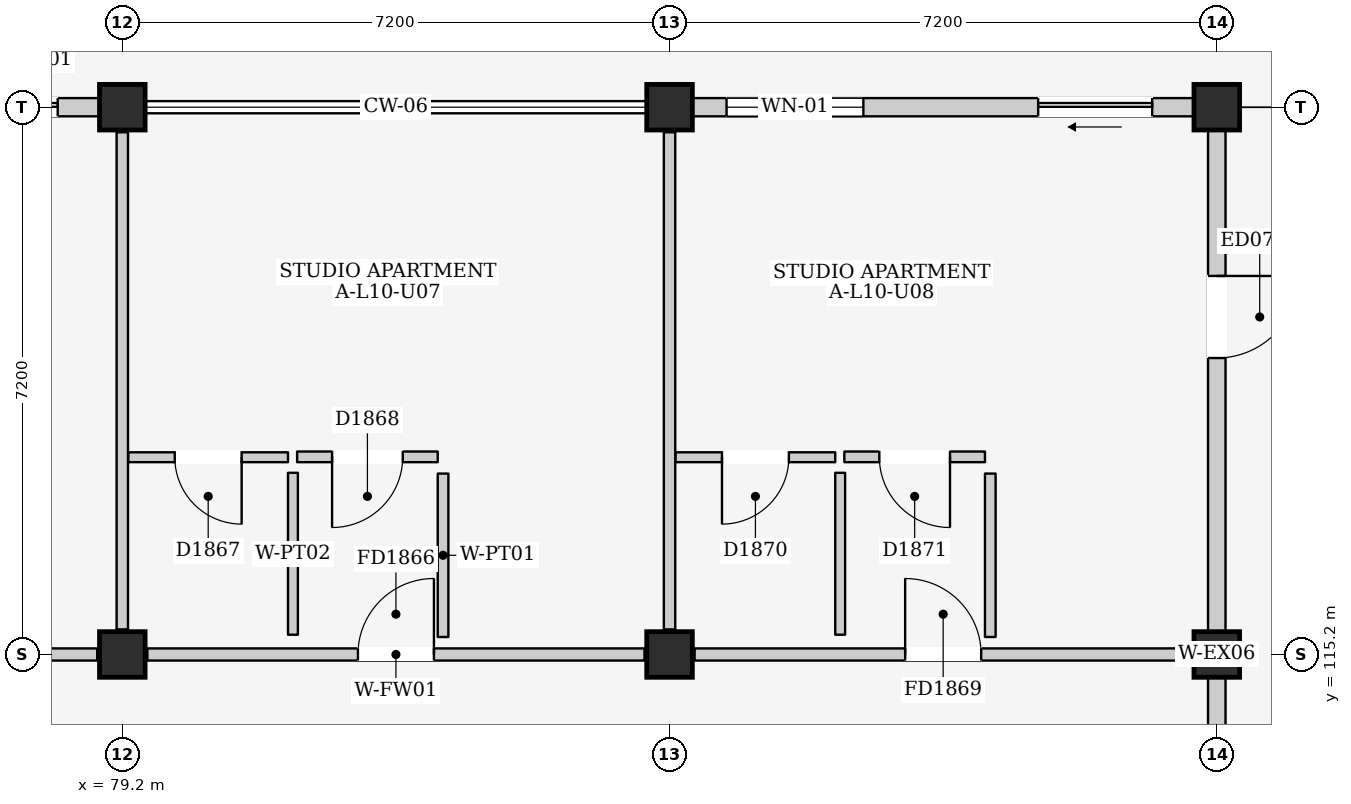
"""IFC4 building model, lengths in metres.
Left out: names, types, materials, properties, quantities, classifications, styles, units other than length and angle.
Written with IfcOpenShell. Run it as: python <this file> out.ifc"""

import sys

from ifc_helpers import new_model, si_unit, direction, frame, frame_2d, origin, origin_2d, place, context, subcontext, project, spatial, rectangle, extrude, element, fill, save


model = new_model("IFC4")
c1 = context("Model", 3, precision=1e-05, world=origin(), true_north=direction((0.0, 1.0)))
c2 = subcontext(c1, "Body", "Model", "MODEL_VIEW")
j1 = project(units=[si_unit("LENGTHUNIT", "METRE"), si_unit("PLANEANGLEUNIT", "RADIAN")], contexts=[c1])
p1 = place(None, origin())
s1 = spatial("IfcSite", under=j1, at=p1, CompositionType="ELEMENT")
p2 = place(p1, origin())
s2 = spatial("IfcBuilding", under=s1, at=p2, CompositionType="ELEMENT")
p3 = place(p2, frame((0.0, 0.0, 34.8)))
s3 = spatial("IfcBuildingStorey", under=s2, at=p3, CompositionType="ELEMENT", Elevation=34.8)
for number, where, z_axis, x_axis in (
    (1, (79.2, 115.2, 0.0), (0.0, 0.0, 1.0), (1.0, 0.0, 0.0)),
    (2, (79.2, 122.4, 0.0), (0.0, 0.0, 1.0), (1.0, 0.0, 0.0)),
    (3, (86.4, 115.2, 0.0), (0.0, 0.0, 1.0), (1.0, 0.0, 0.0)),
    (4, (86.4, 122.4, 0.0), (0.0, 0.0, 1.0), (1.0, 0.0, 0.0)),
    (5, (93.6, 115.2, 0.0), (0.0, 0.0, 1.0), (1.0, 0.0, 0.0)),
    (6, (93.6, 122.4, 0.0), (0.0, 0.0, 1.0), (1.0, 0.0, 0.0)),
):
    element("IfcColumn", number, at=place(p3, frame(where, z_axis=z_axis, x_axis=x_axis)), inside=s3, PredefinedType="COLUMN", context=c2, shape_type="SweptSolid", body=[
        extrude(rectangle(XDim=0.6, YDim=0.6, at=origin_2d()), origin(), (0.0, 0.0, 1.0), 3.2),
    ])
p4 = place(p3, frame((72.3, 122.4, 0.0), z_axis=(0.0, 0.0, 1.0), x_axis=(1.0, 0.0, 0.0)))
e7 = element("IfcWall", 7, at=p4, inside=s3, PredefinedType="ELEMENTEDWALL", context=c2, shape_type="SweptSolid", body=[
    extrude(rectangle(XDim=6.6, YDim=0.24, at=frame_2d((3.3, 0.0))), origin(), (0.0, 0.0, 1.0), 2.495),
])
p5 = place(p4, frame((4.25, 0.0, 0.0)))
e8 = element("IfcOpeningElement", 8, at=p5, cuts=e7, PredefinedType="OPENING", context=c2, shape_type="SweptSolid", body=[
    extrude(rectangle(XDim=1.8, YDim=2.12, at=frame_2d((0.9, 1.06))), frame((0.0, 0.135, 0.0), z_axis=(0.0, -1.0, 0.0), x_axis=(1.0, 0.0, 0.0)), (0.0, 0.0, 1.0), 0.27),
])
p6 = place(p4, frame((0.45, 0.0, 0.785)))
e9 = element("IfcOpeningElement", 9, at=p6, cuts=e7, PredefinedType="OPENING", context=c2, shape_type="SweptSolid", body=[
    extrude(rectangle(XDim=2.05, YDim=1.6, at=frame_2d((1.025, 0.8))), frame((0.0, 0.135, 0.0), z_axis=(0.0, -1.0, 0.0), x_axis=(1.0, 0.0, 0.0)), (0.0, 0.0, 1.0), 0.27),
])
p7 = place(p3, frame((86.7, 122.4, 0.0), z_axis=(0.0, 0.0, 1.0), x_axis=(1.0, 0.0, 0.0)))
e10 = element("IfcWall", 10, at=p7, inside=s3, PredefinedType="ELEMENTEDWALL", context=c2, shape_type="SweptSolid", body=[
    extrude(rectangle(XDim=6.6, YDim=0.24, at=frame_2d((3.3, 0.0))), origin(), (0.0, 0.0, 1.0), 2.495),
])
p8 = place(p7, frame((4.55, 0.0, 0.0)))
e11 = element("IfcOpeningElement", 11, at=p8, cuts=e10, PredefinedType="OPENING", context=c2, shape_type="SweptSolid", body=[
    extrude(rectangle(XDim=1.5, YDim=2.12, at=frame_2d((0.75, 1.06))), frame((0.0, 0.135, 0.0), z_axis=(0.0, -1.0, 0.0), x_axis=(1.0, 0.0, 0.0)), (0.0, 0.0, 1.0), 0.27),
])
p9 = place(p7, frame((0.45, 0.0, 0.885)))
e12 = element("IfcOpeningElement", 12, at=p9, cuts=e10, PredefinedType="OPENING", context=c2, shape_type="SweptSolid", body=[
    extrude(rectangle(XDim=1.8, YDim=1.5, at=frame_2d((0.9, 0.75))), frame((0.0, 0.135, 0.0), z_axis=(0.0, -1.0, 0.0), x_axis=(1.0, 0.0, 0.0)), (0.0, 0.0, 1.0), 0.27),
])
p10 = place(p3, frame((93.6, 108.3, 0.0), z_axis=(0.0, 0.0, 1.0), x_axis=(0.0, 1.0, 0.0)))
e13 = element("IfcWall", 13, at=p10, inside=s3, PredefinedType="ELEMENTEDWALL", context=c2, shape_type="SweptSolid", body=[
    extrude(rectangle(XDim=6.6, YDim=0.23, at=frame_2d((3.3, 0.0))), origin(), (0.0, 0.0, 1.0), 2.445),
])
p11 = place(p10, frame((2.75, 0.0, 1.1)))
e14 = element("IfcOpeningElement", 14, at=p11, cuts=e13, PredefinedType="OPENING", context=c2, shape_type="SweptSolid", body=[
    extrude(rectangle(XDim=1.0, YDim=0.9, at=frame_2d((0.5, 0.45))), frame((0.0, 0.13, 0.0), z_axis=(0.0, -1.0, 0.0), x_axis=(1.0, 0.0, 0.0)), (0.0, 0.0, 1.0), 0.26),
])
p12 = place(p3, frame((93.6, 115.5, 0.0), z_axis=(0.0, 0.0, 1.0), x_axis=(0.0, 1.0, 0.0)))
e15 = element("IfcWall", 15, at=p12, inside=s3, PredefinedType="ELEMENTEDWALL", context=c2, shape_type="SweptSolid", body=[
    extrude(rectangle(XDim=6.6, YDim=0.23, at=frame_2d((3.3, 0.0))), origin(), (0.0, 0.0, 1.0), 2.445),
])
p13 = place(p12, frame((3.6, 0.0, 0.0)))
e16 = element("IfcOpeningElement", 16, at=p13, cuts=e15, PredefinedType="OPENING", context=c2, shape_type="SweptSolid", body=[
    extrude(rectangle(XDim=1.08, YDim=2.12, at=frame_2d((0.54, 1.06))), frame((0.0, 0.13, 0.0), z_axis=(0.0, -1.0, 0.0), x_axis=(1.0, 0.0, 0.0)), (0.0, 0.0, 1.0), 0.26),
])
p14 = place(p3, frame((72.33, 115.2, 0.0), z_axis=(0.0, 0.0, 1.0), x_axis=(1.0, 0.0, 0.0)))
e17 = element("IfcWall", 17, at=p14, inside=s3, PredefinedType="PARTITIONING", context=c2, shape_type="SweptSolid", body=[
    extrude(rectangle(XDim=6.54, YDim=0.16, at=frame_2d((3.27, 0.0))), origin(), (0.0, 0.0, 1.0), 2.295),
])
p15 = place(p14, frame((2.77, 0.0, 0.0)))
e18 = element("IfcOpeningElement", 18, at=p15, cuts=e17, PredefinedType="OPENING", context=c2, shape_type="SweptSolid", body=[
    extrude(rectangle(XDim=1.0, YDim=2.15, at=frame_2d((0.5, 1.075))), frame((0.0, 0.095, 0.0), z_axis=(0.0, -1.0, 0.0), x_axis=(1.0, 0.0, 0.0)), (0.0, 0.0, 1.0), 0.19),
])
p16 = place(p3, frame((79.2, 115.53, 0.0), z_axis=(0.0, 0.0, 1.0), x_axis=(0.0, 1.0, 0.0)))
e19 = element("IfcWall", 19, at=p16, inside=s3, PredefinedType="PARTITIONING", context=c2, shape_type="SweptSolid", body=[
    extrude(rectangle(XDim=6.54, YDim=0.15, at=frame_2d((3.27, 0.0))), origin(), (0.0, 0.0, 1.0), 2.445),
])
p17 = place(p3, frame((79.53, 115.2, 0.0), z_axis=(0.0, 0.0, 1.0), x_axis=(1.0, 0.0, 0.0)))
e20 = element("IfcWall", 20, at=p17, inside=s3, PredefinedType="PARTITIONING", context=c2, shape_type="SweptSolid", body=[
    extrude(rectangle(XDim=6.54, YDim=0.16, at=frame_2d((3.27, 0.0))), origin(), (0.0, 0.0, 1.0), 2.295),
])
p18 = place(p17, frame((2.77, 0.0, 0.0)))
e21 = element("IfcOpeningElement", 21, at=p18, cuts=e20, PredefinedType="OPENING", context=c2, shape_type="SweptSolid", body=[
    extrude(rectangle(XDim=1.0, YDim=2.15, at=frame_2d((0.5, 1.075))), frame((0.0, 0.095, 0.0), z_axis=(0.0, -1.0, 0.0), x_axis=(1.0, 0.0, 0.0)), (0.0, 0.0, 1.0), 0.19),
])
p19 = place(p3, frame((86.4, 115.53, 0.0), z_axis=(0.0, 0.0, 1.0), x_axis=(0.0, 1.0, 0.0)))
e22 = element("IfcWall", 22, at=p19, inside=s3, PredefinedType="PARTITIONING", context=c2, shape_type="SweptSolid", body=[
    extrude(rectangle(XDim=6.54, YDim=0.15, at=frame_2d((3.27, 0.0))), origin(), (0.0, 0.0, 1.0), 2.445),
])
p20 = place(p3, frame((79.28, 117.795, 0.0), z_axis=(0.0, 0.0, 1.0), x_axis=(1.0, 0.0, 0.0)))
e23 = element("IfcWall", 23, at=p20, inside=s3, PredefinedType="PARTITIONING", context=c2, shape_type="SweptSolid", body=[
    extrude(rectangle(XDim=2.1, YDim=0.13, at=frame_2d((1.05, 0.0))), origin(), (0.0, 0.0, 1.0), 2.96),
])
p21 = place(p20, frame((0.61, 0.0, 0.0)))
e24 = element("IfcOpeningElement", 24, at=p21, cuts=e23, PredefinedType="OPENING", context=c2, shape_type="SweptSolid", body=[
    extrude(rectangle(XDim=0.88, YDim=2.1, at=frame_2d((0.44, 1.05))), frame((0.0, 0.08, 0.0), z_axis=(0.0, -1.0, 0.0), x_axis=(1.0, 0.0, 0.0)), (0.0, 0.0, 1.0), 0.16),
])
p22 = place(p3, frame((81.445, 115.46, 0.0), z_axis=(0.0, 0.0, 1.0), x_axis=(0.0, 1.0, 0.0)))
e25 = element("IfcWall", 25, at=p22, inside=s3, PredefinedType="PARTITIONING", context=c2, shape_type="SweptSolid", body=[
    extrude(rectangle(XDim=2.13, YDim=0.13, at=frame_2d((1.065, 0.0))), origin(), (0.0, 0.0, 1.0), 2.96),
])
p23 = place(p3, frame((81.5, 117.8, 0.0), z_axis=(0.0, 0.0, 1.0), x_axis=(1.0, 0.0, 0.0)))
e26 = element("IfcWall", 26, at=p23, inside=s3, PredefinedType="PARTITIONING", context=c2, shape_type="SweptSolid", body=[
    extrude(rectangle(XDim=1.85, YDim=0.14, at=frame_2d((0.925, 0.0))), origin(), (0.0, 0.0, 1.0), 2.96),
])
p24 = place(p23, frame((0.46, 0.0, 0.0)))
e27 = element("IfcOpeningElement", 27, at=p24, cuts=e26, PredefinedType="OPENING", context=c2, shape_type="SweptSolid", body=[
    extrude(rectangle(XDim=0.93, YDim=2.14, at=frame_2d((0.465, 1.07))), frame((0.0, 0.085, 0.0), z_axis=(0.0, -1.0, 0.0), x_axis=(1.0, 0.0, 0.0)), (0.0, 0.0, 1.0), 0.17),
])
p25 = place(p3, frame((83.42, 115.43, 0.0), z_axis=(0.0, 0.0, 1.0), x_axis=(0.0, 1.0, 0.0)))
e28 = element("IfcWall", 28, at=p25, inside=s3, PredefinedType="PARTITIONING", context=c2, shape_type="SweptSolid", body=[
    extrude(rectangle(XDim=2.15, YDim=0.14, at=frame_2d((1.075, 0.0))), origin(), (0.0, 0.0, 1.0), 2.96),
])
p26 = place(p3, frame((86.73, 115.2, 0.0), z_axis=(0.0, 0.0, 1.0), x_axis=(1.0, 0.0, 0.0)))
e29 = element("IfcWall", 29, at=p26, inside=s3, PredefinedType="PARTITIONING", context=c2, shape_type="SweptSolid", body=[
    extrude(rectangle(XDim=6.54, YDim=0.16, at=frame_2d((3.27, 0.0))), origin(), (0.0, 0.0, 1.0), 2.295),
])
p27 = place(p26, frame((2.77, 0.0, 0.0)))
e30 = element("IfcOpeningElement", 30, at=p27, cuts=e29, PredefinedType="OPENING", context=c2, shape_type="SweptSolid", body=[
    extrude(rectangle(XDim=1.0, YDim=2.15, at=frame_2d((0.5, 1.075))), frame((0.0, 0.095, 0.0), z_axis=(0.0, -1.0, 0.0), x_axis=(1.0, 0.0, 0.0)), (0.0, 0.0, 1.0), 0.19),
])
p28 = place(p3, frame((86.48, 117.795, 0.0), z_axis=(0.0, 0.0, 1.0), x_axis=(1.0, 0.0, 0.0)))
e31 = element("IfcWall", 31, at=p28, inside=s3, PredefinedType="PARTITIONING", context=c2, shape_type="SweptSolid", body=[
    extrude(rectangle(XDim=2.1, YDim=0.13, at=frame_2d((1.05, 0.0))), origin(), (0.0, 0.0, 1.0), 2.96),
])
p29 = place(p28, frame((0.61, 0.0, 0.0)))
e32 = element("IfcOpeningElement", 32, at=p29, cuts=e31, PredefinedType="OPENING", context=c2, shape_type="SweptSolid", body=[
    extrude(rectangle(XDim=0.88, YDim=2.1, at=frame_2d((0.44, 1.05))), frame((0.0, 0.08, 0.0), z_axis=(0.0, -1.0, 0.0), x_axis=(1.0, 0.0, 0.0)), (0.0, 0.0, 1.0), 0.16),
])
p30 = place(p3, frame((88.645, 115.46, 0.0), z_axis=(0.0, 0.0, 1.0), x_axis=(0.0, 1.0, 0.0)))
e33 = element("IfcWall", 33, at=p30, inside=s3, PredefinedType="PARTITIONING", context=c2, shape_type="SweptSolid", body=[
    extrude(rectangle(XDim=2.13, YDim=0.13, at=frame_2d((1.065, 0.0))), origin(), (0.0, 0.0, 1.0), 2.96),
])
p31 = place(p3, frame((88.7, 117.8, 0.0), z_axis=(0.0, 0.0, 1.0), x_axis=(1.0, 0.0, 0.0)))
e34 = element("IfcWall", 34, at=p31, inside=s3, PredefinedType="PARTITIONING", context=c2, shape_type="SweptSolid", body=[
    extrude(rectangle(XDim=1.85, YDim=0.14, at=frame_2d((0.925, 0.0))), origin(), (0.0, 0.0, 1.0), 2.96),
])
p32 = place(p31, frame((0.46, 0.0, 0.0)))
e35 = element("IfcOpeningElement", 35, at=p32, cuts=e34, PredefinedType="OPENING", context=c2, shape_type="SweptSolid", body=[
    extrude(rectangle(XDim=0.93, YDim=2.14, at=frame_2d((0.465, 1.07))), frame((0.0, 0.085, 0.0), z_axis=(0.0, -1.0, 0.0), x_axis=(1.0, 0.0, 0.0)), (0.0, 0.0, 1.0), 0.17),
])
p33 = place(p3, frame((90.62, 115.43, 0.0), z_axis=(0.0, 0.0, 1.0), x_axis=(0.0, 1.0, 0.0)))
e36 = element("IfcWall", 36, at=p33, inside=s3, PredefinedType="PARTITIONING", context=c2, shape_type="SweptSolid", body=[
    extrude(rectangle(XDim=2.15, YDim=0.14, at=frame_2d((1.075, 0.0))), origin(), (0.0, 0.0, 1.0), 2.96),
])
p34 = place(p5, frame((1.8, 0.0, 0.0), z_axis=(0.0, 0.0, 1.0), x_axis=(-1.0, 0.0, 0.0)))
e37 = element("IfcDoor", 37, at=p34, inside=s3, OperationType="SLIDING_TO_LEFT", PredefinedType="DOOR", context=c2, shape_type="SweptSolid", body=[
    extrude(rectangle(XDim=1.8, YDim=2.12, at=frame_2d((0.9, 1.06))), frame((0.0, 0.025, 0.0), z_axis=(0.0, -1.0, 0.0), x_axis=(1.0, 0.0, 0.0)), (0.0, 0.0, 1.0), 0.05),
])
fill(e8, e37)
p35 = place(p8, frame((1.5, 0.0, 0.0), z_axis=(0.0, 0.0, 1.0), x_axis=(-1.0, 0.0, 0.0)))
e38 = element("IfcDoor", 38, at=p35, inside=s3, OperationType="SLIDING_TO_LEFT", PredefinedType="DOOR", context=c2, shape_type="SweptSolid", body=[
    extrude(rectangle(XDim=1.5, YDim=2.12, at=frame_2d((0.75, 1.06))), frame((0.0, 0.025, 0.0), z_axis=(0.0, -1.0, 0.0), x_axis=(1.0, 0.0, 0.0)), (0.0, 0.0, 1.0), 0.05),
])
fill(e11, e38)
p36 = place(p9, origin())
e39 = element("IfcWindow", 39, at=p36, inside=s3, PartitioningType="DOUBLE_PANEL_VERTICAL", PredefinedType="WINDOW", context=c2, shape_type="SweptSolid", body=[
    extrude(rectangle(XDim=1.8, YDim=1.5, at=frame_2d((0.9, 0.75))), frame((0.0, 0.03, 0.0), z_axis=(0.0, -1.0, 0.0), x_axis=(1.0, 0.0, 0.0)), (0.0, 0.0, 1.0), 0.06),
])
fill(e12, e39)
p37 = place(p13, frame((1.08, 0.0, 0.0), z_axis=(0.0, 0.0, 1.0), x_axis=(-1.0, 0.0, 0.0)))
e40 = element("IfcDoor", 40, at=p37, inside=s3, OperationType="SINGLE_SWING_LEFT", PredefinedType="DOOR", context=c2, shape_type="SweptSolid", body=[
    extrude(rectangle(XDim=1.08, YDim=2.12, at=frame_2d((0.54, 1.06))), frame((0.0, 0.025, 0.0), z_axis=(0.0, -1.0, 0.0), x_axis=(1.0, 0.0, 0.0)), (0.0, 0.0, 1.0), 0.05),
])
fill(e16, e40)
p38 = place(p18, origin())
e41 = element("IfcDoor", 41, at=p38, inside=s3, OperationType="SINGLE_SWING_RIGHT", PredefinedType="DOOR", context=c2, shape_type="SweptSolid", body=[
    extrude(rectangle(XDim=1.0, YDim=2.15, at=frame_2d((0.5, 1.075))), frame((0.0, 0.025, 0.0), z_axis=(0.0, -1.0, 0.0), x_axis=(1.0, 0.0, 0.0)), (0.0, 0.0, 1.0), 0.05),
])
fill(e21, e41)
p39 = place(p21, frame((0.88, 0.0, 0.0), z_axis=(0.0, 0.0, 1.0), x_axis=(-1.0, 0.0, 0.0)))
e42 = element("IfcDoor", 42, at=p39, inside=s3, OperationType="SINGLE_SWING_LEFT", PredefinedType="DOOR", context=c2, shape_type="SweptSolid", body=[
    extrude(rectangle(XDim=0.88, YDim=2.1, at=frame_2d((0.44, 1.05))), frame((0.0, 0.025, 0.0), z_axis=(0.0, -1.0, 0.0), x_axis=(1.0, 0.0, 0.0)), (0.0, 0.0, 1.0), 0.05),
])
fill(e24, e42)
p40 = place(p24, frame((0.93, 0.0, 0.0), z_axis=(0.0, 0.0, 1.0), x_axis=(-1.0, 0.0, 0.0)))
e43 = element("IfcDoor", 43, at=p40, inside=s3, OperationType="SINGLE_SWING_RIGHT", PredefinedType="DOOR", context=c2, shape_type="SweptSolid", body=[
    extrude(rectangle(XDim=0.93, YDim=2.14, at=frame_2d((0.465, 1.07))), frame((0.0, 0.025, 0.0), z_axis=(0.0, -1.0, 0.0), x_axis=(1.0, 0.0, 0.0)), (0.0, 0.0, 1.0), 0.05),
])
fill(e27, e43)
p41 = place(p27, origin())
e44 = element("IfcDoor", 44, at=p41, inside=s3, OperationType="SINGLE_SWING_LEFT", PredefinedType="DOOR", context=c2, shape_type="SweptSolid", body=[
    extrude(rectangle(XDim=1.0, YDim=2.15, at=frame_2d((0.5, 1.075))), frame((0.0, 0.025, 0.0), z_axis=(0.0, -1.0, 0.0), x_axis=(1.0, 0.0, 0.0)), (0.0, 0.0, 1.0), 0.05),
])
fill(e30, e44)
p42 = place(p29, frame((0.88, 0.0, 0.0), z_axis=(0.0, 0.0, 1.0), x_axis=(-1.0, 0.0, 0.0)))
e45 = element("IfcDoor", 45, at=p42, inside=s3, OperationType="SINGLE_SWING_RIGHT", PredefinedType="DOOR", context=c2, shape_type="SweptSolid", body=[
    extrude(rectangle(XDim=0.88, YDim=2.1, at=frame_2d((0.44, 1.05))), frame((0.0, 0.025, 0.0), z_axis=(0.0, -1.0, 0.0), x_axis=(1.0, 0.0, 0.0)), (0.0, 0.0, 1.0), 0.05),
])
fill(e32, e45)
p43 = place(p32, frame((0.93, 0.0, 0.0), z_axis=(0.0, 0.0, 1.0), x_axis=(-1.0, 0.0, 0.0)))
e46 = element("IfcDoor", 46, at=p43, inside=s3, OperationType="SINGLE_SWING_LEFT", PredefinedType="DOOR", context=c2, shape_type="SweptSolid", body=[
    extrude(rectangle(XDim=0.93, YDim=2.14, at=frame_2d((0.465, 1.07))), frame((0.0, 0.025, 0.0), z_axis=(0.0, -1.0, 0.0), x_axis=(1.0, 0.0, 0.0)), (0.0, 0.0, 1.0), 0.05),
])
fill(e35, e46)
save(model, sys.argv[1])
